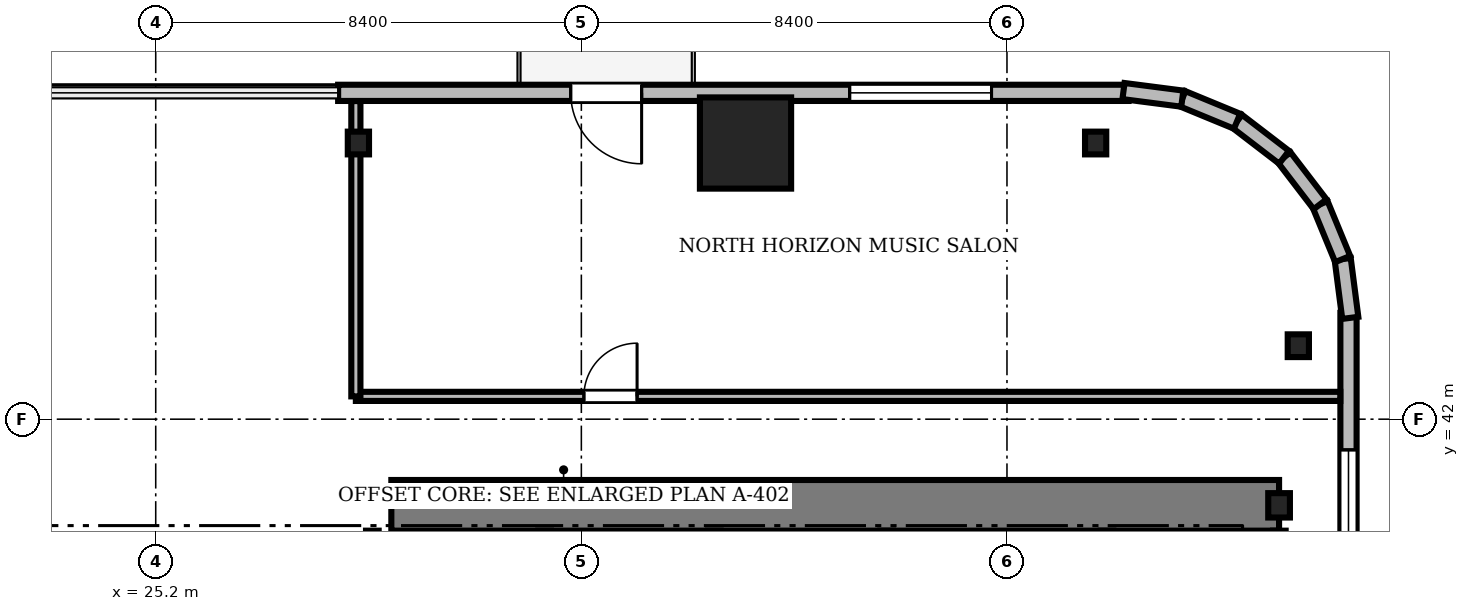
"""IFC4 building model, lengths in metres.
Left out: names, types, materials, properties, quantities, classifications, styles, units other than length and angle.
Written with IfcOpenShell. Run it as: python <this file> out.ifc"""

import sys

from ifc_helpers import new_model, si_unit, direction, frame, frame_2d, origin, origin_2d, place, context, subcontext, project, spatial, rectangle, i_section, extrude, source, transform, mapped, element, fill, save


model = new_model("IFC4")
c1 = context("Model", 3, precision=1e-05, world=origin(), true_north=direction((0.0, 1.0)))
c2 = subcontext(c1, "Body", "Model", "MODEL_VIEW")
j1 = project(units=[si_unit("LENGTHUNIT", "METRE"), si_unit("PLANEANGLEUNIT", "RADIAN")], contexts=[c1])
p1 = place(None, origin())
s1 = spatial("IfcSite", under=j1, at=p1, CompositionType="ELEMENT")
p2 = place(p1, origin())
s2 = spatial("IfcBuilding", under=s1, at=p2, CompositionType="ELEMENT")
p3 = place(p2, frame((0.0, 0.0, 78.7)))
s3 = spatial("IfcBuildingStorey", under=s2, at=p3, CompositionType="ELEMENT", Elevation=78.7)
m1 = source(origin(), c2, "Body", "SweptSolid", [
    extrude(rectangle(XDim=17.52, YDim=1.0, at=frame_2d((8.76, 0.0))), origin(), (0.0, 0.0, 1.0), 3.41),
])
p4 = place(p3, frame((29.85, 40.3, 0.0), z_axis=(0.0, 0.0, 1.0), x_axis=(1.0, 0.0, 0.0)))
e1 = element("IfcWall", 1, at=p4, inside=s3, PredefinedType="SHEAR", context=c2, shape_type="MappedRepresentation", body=[
    mapped(m1, transform((0.0, 0.0, 0.0), scale=1.0)),
])
m2 = source(origin(), c2, "Body", "SweptSolid", [
    extrude(i_section(OverallWidth=0.428, OverallDepth=0.481, WebThickness=0.04, FlangeThickness=0.063, FilletRadius=0.015, at=origin_2d()), origin(), (0.0, 0.0, 1.0), 3.41),
])
p5 = place(p3, frame((47.37, 40.3, 0.0), z_axis=(0.0, 0.0, 1.0), x_axis=(1.0, 0.0, 0.0)))
e2 = element("IfcColumn", 2, at=p5, inside=s3, PredefinedType="COLUMN", context=c2, shape_type="MappedRepresentation", body=[
    mapped(m2, transform((0.0, 0.0, 0.0), scale=1.0)),
])
m3 = source(origin(), c2, "Body", "SweptSolid", [
    extrude(rectangle(XDim=1.8, YDim=1.8, at=origin_2d()), origin(), (0.0, 0.0, 1.0), 3.41),
])
p6 = place(p3, frame((36.84, 47.45, 0.0), z_axis=(0.0, 0.0, 1.0), x_axis=(1.0, 0.0, 0.0)))
e3 = element("IfcColumn", 3, at=p6, inside=s3, PredefinedType="COLUMN", context=c2, shape_type="MappedRepresentation", body=[
    mapped(m3, transform((0.0, 0.0, 0.0), scale=1.0)),
])
m4 = source(origin(), c2, "Body", "SweptSolid", [
    extrude(i_section(OverallWidth=0.419, OverallDepth=0.449, WebThickness=0.031, FlangeThickness=0.048, FilletRadius=0.015, at=origin_2d()), origin(), (0.0, 0.0, 1.0), 3.41),
])
for number, where, z_axis, x_axis in (
    (4, (47.75, 43.45, 0.0), (0.0, 0.0, 1.0), (1.0, 0.0, 0.0)),
    (5, (43.75, 47.45, 0.0), (0.0, 0.0, 1.0), (1.0, 0.0, 0.0)),
    (6, (29.2, 47.45, 0.0), (0.0, 0.0, 1.0), (1.0, 0.0, 0.0)),
):
    element("IfcColumn", number, at=place(p3, frame(where, z_axis=z_axis, x_axis=x_axis)), inside=s3, PredefinedType="COLUMN", context=c2, shape_type="MappedRepresentation", body=[
        mapped(m4, transform((0.0, 0.0, 0.0), scale=1.0)),
    ])
m5 = source(origin(), c2, "Body", "SweptSolid", [
    extrude(rectangle(XDim=15.6, YDim=0.32, at=frame_2d((7.8, 0.0))), origin(), (0.0, 0.0, 1.0), 3.41),
])
p7 = place(p3, frame((44.4, 48.44, 0.0), z_axis=(0.0, 0.0, 1.0), x_axis=(-1.0, 0.0, 0.0)))
e7 = element("IfcWall", 7, at=p7, inside=s3, PredefinedType="SOLIDWALL", context=c2, shape_type="MappedRepresentation", body=[
    mapped(m5, transform((0.0, 0.0, 0.0), scale=1.0)),
])
m6 = source(origin(), c2, "Body", "SweptSolid", [
    extrude(rectangle(XDim=1.4, YDim=2.3, at=frame_2d((0.7, 1.15))), frame((0.0, 0.17, 0.0), z_axis=(0.0, -1.0, 0.0), x_axis=(1.0, 0.0, 0.0)), (0.0, 0.0, 1.0), 0.34),
])
p8 = place(p7, frame((9.61, 0.0, 0.0)))
e8 = element("IfcOpeningElement", 8, at=p8, cuts=e7, PredefinedType="OPENING", context=c2, shape_type="MappedRepresentation", body=[
    mapped(m6, transform((0.0, 0.0, 0.0), scale=1.0)),
])
m7 = source(origin(), c2, "Body", "SweptSolid", [
    extrude(rectangle(XDim=2.8, YDim=2.4, at=frame_2d((1.4, 1.2))), frame((0.0, 0.17, 0.0), z_axis=(0.0, -1.0, 0.0), x_axis=(1.0, 0.0, 0.0)), (0.0, 0.0, 1.0), 0.34),
])
p9 = place(p7, frame((2.705, 0.0, 0.72)))
e9 = element("IfcOpeningElement", 9, at=p9, cuts=e7, PredefinedType="OPENING", context=c2, shape_type="MappedRepresentation", body=[
    mapped(m7, transform((0.0, 0.0, 0.0), scale=1.0)),
])
m8 = source(origin(), c2, "Body", "SweptSolid", [
    extrude(rectangle(XDim=15.6, YDim=0.32, at=frame_2d((7.8, 0.0))), origin(), (0.0, 0.0, 1.0), 3.41),
])
p10 = place(p3, frame((48.74, 28.5, 0.0), z_axis=(0.0, 0.0, 1.0), x_axis=(0.0, 1.0, 0.0)))
e10 = element("IfcWall", 10, at=p10, inside=s3, PredefinedType="SOLIDWALL", context=c2, shape_type="MappedRepresentation", body=[
    mapped(m8, transform((0.0, 0.0, 0.0), scale=1.0)),
])
p11 = place(p10, frame((10.095, 0.0, 0.72)))
e11 = element("IfcOpeningElement", 11, at=p11, cuts=e10, PredefinedType="OPENING", context=c2, shape_type="MappedRepresentation", body=[
    mapped(m7, transform((0.0, 0.0, 0.0), scale=1.0)),
])
m9 = source(origin(), c2, "Body", "SweptSolid", [
    extrude(rectangle(XDim=1.17, YDim=0.32, at=frame_2d((0.585, 0.0))), origin(), (0.0, 0.0, 1.0), 3.41),
])
p12 = place(p3, frame((48.776, 44.0, 0.0), z_axis=(0.0, 0.0, 1.0), x_axis=(-0.128295670475, 0.991735963317, 0.0)))
e12 = element("IfcWall", 12, at=p12, inside=s3, PredefinedType="SOLIDWALL", context=c2, shape_type="MappedRepresentation", body=[
    mapped(m9, transform((0.0, 0.0, 0.0), scale=1.0)),
])
m10 = source(origin(), c2, "Body", "SweptSolid", [
    extrude(rectangle(XDim=1.169, YDim=0.32, at=frame_2d((0.584, 0.0))), origin(), (0.0, 0.0, 1.0), 3.41),
])
p13 = place(p3, frame((48.625, 45.16, 0.0), z_axis=(0.0, 0.0, 1.0), x_axis=(-0.381054331552, 0.924552646638, 0.0)))
e13 = element("IfcWall", 13, at=p13, inside=s3, PredefinedType="SOLIDWALL", context=c2, shape_type="MappedRepresentation", body=[
    mapped(m10, transform((0.0, 0.0, 0.0), scale=1.0)),
])
m11 = source(origin(), c2, "Body", "SweptSolid", [
    extrude(rectangle(XDim=1.169, YDim=0.32, at=frame_2d((0.584, 0.0))), origin(), (0.0, 0.0, 1.0), 3.41),
])
p14 = place(p3, frame((48.18, 46.241, 0.0), z_axis=(0.0, 0.0, 1.0), x_axis=(-0.608387696831, 0.793639975269, 0.0)))
e14 = element("IfcWall", 14, at=p14, inside=s3, PredefinedType="SOLIDWALL", context=c2, shape_type="MappedRepresentation", body=[
    mapped(m11, transform((0.0, 0.0, 0.0), scale=1.0)),
])
m12 = source(origin(), c2, "Body", "SweptSolid", [
    extrude(rectangle(XDim=1.169, YDim=0.32, at=frame_2d((0.584, 0.0))), origin(), (0.0, 0.0, 1.0), 3.41),
])
p15 = place(p3, frame((47.469, 47.169, 0.0), z_axis=(0.0, 0.0, 1.0), x_axis=(-0.793663520347, 0.608356981114, 0.0)))
e15 = element("IfcWall", 15, at=p15, inside=s3, PredefinedType="SOLIDWALL", context=c2, shape_type="MappedRepresentation", body=[
    mapped(m12, transform((0.0, 0.0, 0.0), scale=1.0)),
])
p16 = place(p3, frame((46.541, 47.88, 0.0), z_axis=(0.0, 0.0, 1.0), x_axis=(-0.924552646638, 0.381054331552, 0.0)))
e16 = element("IfcWall", 16, at=p16, inside=s3, PredefinedType="SOLIDWALL", context=c2, shape_type="MappedRepresentation", body=[
    mapped(m10, transform((0.0, 0.0, 0.0), scale=1.0)),
])
p17 = place(p3, frame((45.46, 48.325, 0.0), z_axis=(0.0, 0.0, 1.0), x_axis=(-0.991735963317, 0.128295670475, 0.0)))
e17 = element("IfcWall", 17, at=p17, inside=s3, PredefinedType="SOLIDWALL", context=c2, shape_type="MappedRepresentation", body=[
    mapped(m9, transform((0.0, 0.0, 0.0), scale=1.0)),
])
m13 = source(origin(), c2, "Body", "SweptSolid", [
    extrude(rectangle(XDim=9.15, YDim=0.25, at=frame_2d((4.575, 0.0))), origin(), (0.0, 0.0, 1.0), 3.45),
])
for number, where, z_axis, x_axis in (
    (18, (29.475, 30.65, 0.0), (0.0, 0.0, 1.0), (0.0, 1.0, 0.0)),
    (19, (32.875, 30.65, 0.0), (0.0, 0.0, 1.0), (0.0, 1.0, 0.0)),
    (20, (36.225, 30.65, 0.0), (0.0, 0.0, 1.0), (0.0, 1.0, 0.0)),
    (21, (39.625, 30.65, 0.0), (0.0, 0.0, 1.0), (0.0, 1.0, 0.0)),
    (22, (43.975, 30.65, 0.0), (0.0, 0.0, 1.0), (0.0, 1.0, 0.0)),
    (23, (47.375, 30.65, 0.0), (0.0, 0.0, 1.0), (0.0, 1.0, 0.0)),
):
    element("IfcWall", number, at=place(p3, frame(where, z_axis=z_axis, x_axis=x_axis)), inside=s3, PredefinedType="SOLIDWALL", context=c2, shape_type="MappedRepresentation", body=[
        mapped(m13, transform((0.0, 0.0, 0.0), scale=1.0)),
    ])
m14 = source(origin(), c2, "Body", "SweptSolid", [
    extrude(rectangle(XDim=19.428, YDim=0.18, at=frame_2d((9.714, 0.0))), origin(), (0.0, 0.0, 1.0), 2.652),
])
p18 = place(p3, frame((29.15, 42.45, 0.0), z_axis=(0.0, 0.0, 1.0), x_axis=(1.0, 0.0, 0.0)))
e24 = element("IfcWall", 24, at=p18, inside=s3, PredefinedType="PARTITIONING", context=c2, shape_type="MappedRepresentation", body=[
    mapped(m14, transform((0.0, 0.0, 0.0), scale=1.0)),
])
m15 = source(origin(), c2, "Body", "SweptSolid", [
    extrude(rectangle(XDim=1.05, YDim=2.2, at=frame_2d((0.525, 1.1))), frame((0.0, 0.1, 0.0), z_axis=(0.0, -1.0, 0.0), x_axis=(1.0, 0.0, 0.0)), (0.0, 0.0, 1.0), 0.2),
])
p19 = place(p18, frame((4.5, 0.0, 0.0)))
e25 = element("IfcOpeningElement", 25, at=p19, cuts=e24, PredefinedType="OPENING", context=c2, shape_type="MappedRepresentation", body=[
    mapped(m15, transform((0.0, 0.0, 0.0), scale=1.0)),
])
m16 = source(origin(), c2, "Body", "SweptSolid", [
    extrude(rectangle(XDim=5.828, YDim=0.18, at=frame_2d((2.914, 0.0))), origin(), (0.0, 0.0, 1.0), 2.652),
])
p20 = place(p3, frame((29.15, 42.45, 0.0), z_axis=(0.0, 0.0, 1.0), x_axis=(0.0, 1.0, 0.0)))
e26 = element("IfcWall", 26, at=p20, inside=s3, PredefinedType="PARTITIONING", context=c2, shape_type="MappedRepresentation", body=[
    mapped(m16, transform((0.0, 0.0, 0.0), scale=1.0)),
])
m17 = source(origin(), c2, "Body", "SweptSolid", [
    extrude(rectangle(XDim=1.4, YDim=2.3, at=frame_2d((0.7, 1.15))), frame((0.0, 0.025, 0.0), z_axis=(0.0, -1.0, 0.0), x_axis=(1.0, 0.0, 0.0)), (0.0, 0.0, 1.0), 0.05),
])
p21 = place(p8, frame((1.4, 0.0, 0.0), z_axis=(0.0, 0.0, 1.0), x_axis=(-1.0, 0.0, 0.0)))
e27 = element("IfcDoor", 27, at=p21, inside=s3, OperationType="DOUBLE_DOOR_SLIDING", PredefinedType="DOOR", context=c2, shape_type="MappedRepresentation", body=[
    mapped(m17, transform((0.0, 0.0, 0.0), scale=1.0)),
])
fill(e8, e27)
m18 = source(origin(), c2, "Body", "SweptSolid", [
    extrude(rectangle(XDim=2.8, YDim=2.4, at=frame_2d((1.4, 1.2))), frame((0.0, 0.03, 0.0), z_axis=(0.0, -1.0, 0.0), x_axis=(1.0, 0.0, 0.0)), (0.0, 0.0, 1.0), 0.06),
])
p22 = place(p9, origin())
e28 = element("IfcWindow", 28, at=p22, inside=s3, PartitioningType="SINGLE_PANEL", PredefinedType="WINDOW", context=c2, shape_type="MappedRepresentation", body=[
    mapped(m18, transform((0.0, 0.0, 0.0), scale=1.0)),
])
fill(e9, e28)
p23 = place(p11, origin())
e29 = element("IfcWindow", 29, at=p23, inside=s3, PartitioningType="SINGLE_PANEL", PredefinedType="WINDOW", context=c2, shape_type="MappedRepresentation", body=[
    mapped(m18, transform((0.0, 0.0, 0.0), scale=1.0)),
])
fill(e11, e29)
m19 = source(origin(), c2, "Body", "SweptSolid", [
    extrude(rectangle(XDim=1.05, YDim=2.2, at=frame_2d((0.525, 1.1))), frame((0.0, 0.025, 0.0), z_axis=(0.0, -1.0, 0.0), x_axis=(1.0, 0.0, 0.0)), (0.0, 0.0, 1.0), 0.05),
])
p24 = place(p19, origin())
e30 = element("IfcDoor", 30, at=p24, inside=s3, OperationType="SINGLE_SWING_RIGHT", PredefinedType="DOOR", context=c2, shape_type="MappedRepresentation", body=[
    mapped(m19, transform((0.0, 0.0, 0.0), scale=1.0)),
])
fill(e25, e30)
save(model, sys.argv[1])
